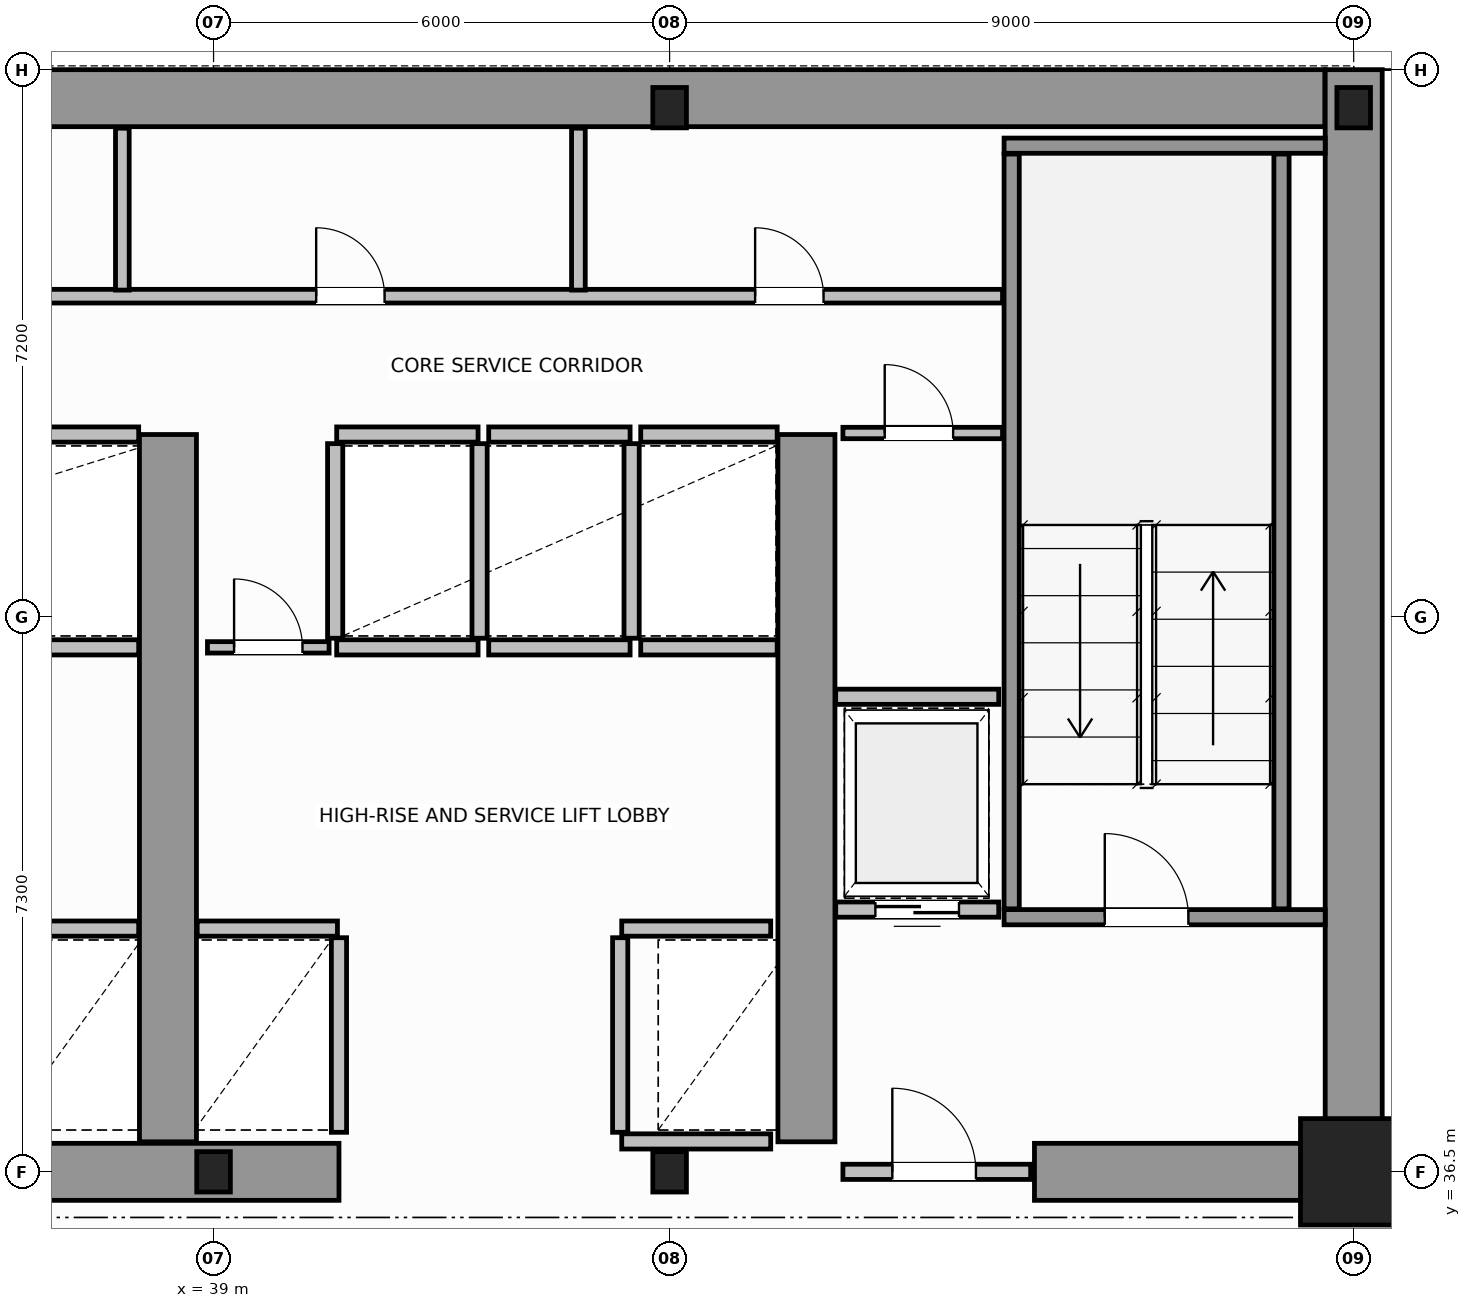
"""IFC4 building model, lengths in metres.
Left out: names, types, materials, properties, quantities, classifications, styles, units other than length and angle.
Written with IfcOpenShell. Run it as: python <this file> out.ifc"""

import sys

from ifc_helpers import new_model, si_unit, direction, frame, frame_2d, origin, origin_2d, place, context, subcontext, project, spatial, rectangle, i_section, extrude, source, transform, mapped, element, fill, save


model = new_model("IFC4")
c1 = context("Model", 3, precision=1e-05, world=origin(), true_north=direction((0.0, 1.0)))
c2 = subcontext(c1, "Body", "Model", "MODEL_VIEW")
j1 = project(units=[si_unit("LENGTHUNIT", "METRE"), si_unit("PLANEANGLEUNIT", "RADIAN")], contexts=[c1])
p1 = place(None, origin())
s1 = spatial("IfcSite", under=j1, at=p1, CompositionType="ELEMENT")
p2 = place(p1, origin())
s2 = spatial("IfcBuilding", under=s1, at=p2, CompositionType="ELEMENT")
p3 = place(p2, frame((0.0, 0.0, 95.8)))
s3 = spatial("IfcBuildingStorey", under=s2, at=p3, CompositionType="ELEMENT", Elevation=95.8)
m1 = source(origin(), c2, "Body", "SweptSolid", [
    extrude(i_section(OverallWidth=0.442, OverallDepth=0.531, WebThickness=0.065, FlangeThickness=0.076, FilletRadius=0.015, at=origin_2d()), origin(), (0.0, 0.0, 1.0), 3.8),
])
for number, where, z_axis, x_axis in (
    (1, (39.0, 36.5, 0.0), (0.0, 0.0, 1.0), (1.0, 0.0, 0.0)),
    (2, (45.0, 36.5, 0.0), (0.0, 0.0, 1.0), (1.0, 0.0, 0.0)),
):
    element("IfcColumn", number, at=place(p3, frame(where, z_axis=z_axis, x_axis=x_axis)), inside=s3, PredefinedType="COLUMN", context=c2, shape_type="MappedRepresentation", body=[
        mapped(m1, transform((0.0, 0.0, 0.0), scale=1.0)),
    ])
m2 = source(origin(), c2, "Body", "SweptSolid", [
    extrude(rectangle(XDim=1.4, YDim=1.4, at=origin_2d()), origin(), (0.0, 0.0, 1.0), 3.8),
])
p4 = place(p3, frame((54.0, 36.5, 0.0), z_axis=(0.0, 0.0, 1.0), x_axis=(1.0, 0.0, 0.0)))
e3 = element("IfcColumn", 3, at=p4, inside=s3, PredefinedType="COLUMN", context=c2, shape_type="MappedRepresentation", body=[
    mapped(m2, transform((0.0, 0.0, 0.0), scale=1.0)),
])
for number, where, z_axis, x_axis in (
    (4, (45.0, 50.5, 0.0), (0.0, 0.0, 1.0), (1.0, 0.0, 0.0)),
    (5, (54.0, 50.5, 0.0), (0.0, 0.0, 1.0), (1.0, 0.0, 0.0)),
):
    element("IfcColumn", number, at=place(p3, frame(where, z_axis=z_axis, x_axis=x_axis)), inside=s3, PredefinedType="COLUMN", context=c2, shape_type="MappedRepresentation", body=[
        mapped(m1, transform((0.0, 0.0, 0.0), scale=1.0)),
    ])
p5 = place(p3, frame((34.002, 50.625, 0.0), z_axis=(0.0, 0.0, 1.0), x_axis=(1.0, 0.0, 0.0)))
e6 = element("IfcWall", 6, at=p5, inside=s3, PredefinedType="SHEAR", context=c2, shape_type="SweptSolid", body=[
    extrude(rectangle(XDim=19.619, YDim=0.75, at=frame_2d((9.81, 0.0))), origin(), (0.0, 0.0, 1.0), 3.8),
])
p6 = place(p3, frame((54.0, 36.5, 0.0), z_axis=(0.0, 0.0, 1.0), x_axis=(0.0, 1.0, 0.0)))
e7 = element("IfcWall", 7, at=p6, inside=s3, PredefinedType="SHEAR", context=c2, shape_type="SweptSolid", body=[
    extrude(rectangle(XDim=14.5, YDim=0.75, at=frame_2d((7.25, 0.0))), origin(), (0.0, 0.0, 1.0), 3.8),
])
p7 = place(p3, frame((36.15, 36.5, 0.0), z_axis=(0.0, 0.0, 1.0), x_axis=(1.0, 0.0, 0.0)))
e8 = element("IfcWall", 8, at=p7, inside=s3, PredefinedType="SHEAR", context=c2, shape_type="SweptSolid", body=[
    extrude(rectangle(XDim=4.5, YDim=0.75, at=frame_2d((2.25, 0.0))), origin(), (0.0, 0.0, 1.0), 3.8),
])
p8 = place(p3, frame((49.8, 36.5, 0.0), z_axis=(0.0, 0.0, 1.0), x_axis=(1.0, 0.0, 0.0)))
e9 = element("IfcWall", 9, at=p8, inside=s3, PredefinedType="SHEAR", context=c2, shape_type="SweptSolid", body=[
    extrude(rectangle(XDim=3.805, YDim=0.75, at=frame_2d((1.902, 0.0))), origin(), (0.0, 0.0, 1.0), 2.38),
])
for number, where, z_axis, x_axis in (
    (10, (38.4, 36.895, 0.0), (0.0, 0.0, 1.0), (0.0, 1.0, 0.0)),
    (11, (46.8, 36.895, 0.0), (0.0, 0.0, 1.0), (0.0, 1.0, 0.0)),
):
    element("IfcWall", number, at=place(p3, frame(where, z_axis=z_axis, x_axis=x_axis)), inside=s3, PredefinedType="SHEAR", context=c2, shape_type="SweptSolid", body=[
        extrude(rectangle(XDim=9.305, YDim=0.75, at=frame_2d((4.652, 0.0))), origin(), (0.0, 0.0, 1.0), 3.8),
    ])
p9 = place(p3, frame((49.4, 39.85, 0.0), z_axis=(0.0, 0.0, 1.0), x_axis=(1.0, 0.0, 0.0)))
e12 = element("IfcWall", 12, at=p9, inside=s3, PredefinedType="SOLIDWALL", context=c2, shape_type="SweptSolid", body=[
    extrude(rectangle(XDim=4.225, YDim=0.2, at=frame_2d((2.113, 0.0))), origin(), (0.0, 0.0, 1.0), 3.8),
])
p10 = place(p9, frame((1.325, 0.0, 0.0)))
e13 = element("IfcOpeningElement", 13, at=p10, cuts=e12, PredefinedType="OPENING", context=c2, shape_type="SweptSolid", body=[
    extrude(rectangle(XDim=1.1, YDim=2.15, at=frame_2d((0.55, 1.075))), frame((0.0, 0.11, 0.0), z_axis=(0.0, -1.0, 0.0), x_axis=(1.0, 0.0, 0.0)), (0.0, 0.0, 1.0), 0.22),
])
p11 = place(p3, frame((49.4, 50.0, 0.0), z_axis=(0.0, 0.0, 1.0), x_axis=(1.0, 0.0, 0.0)))
e14 = element("IfcWall", 14, at=p11, inside=s3, PredefinedType="SOLIDWALL", context=c2, shape_type="SweptSolid", body=[
    extrude(rectangle(XDim=4.225, YDim=0.2, at=frame_2d((2.113, 0.0))), origin(), (0.0, 0.0, 1.0), 3.8),
])
for number, where, z_axis, x_axis in (
    (15, (49.5, 39.96, 0.0), (0.0, 0.0, 1.0), (0.0, 1.0, 0.0)),
    (16, (53.05, 39.96, 0.0), (0.0, 0.0, 1.0), (0.0, 1.0, 0.0)),
):
    element("IfcWall", number, at=place(p3, frame(where, z_axis=z_axis, x_axis=x_axis)), inside=s3, PredefinedType="SOLIDWALL", context=c2, shape_type="SweptSolid", body=[
        extrude(rectangle(XDim=9.93, YDim=0.2, at=frame_2d((4.965, 0.0))), origin(), (0.0, 0.0, 1.0), 3.8),
    ])
p12 = place(p3, frame((47.28, 36.5, 0.0), z_axis=(0.0, 0.0, 1.0), x_axis=(1.0, 0.0, 0.0)))
e17 = element("IfcWall", 17, at=p12, inside=s3, PredefinedType="SOLIDWALL", context=c2, shape_type="SweptSolid", body=[
    extrude(rectangle(XDim=2.47, YDim=0.2, at=frame_2d((1.235, 0.0))), origin(), (0.0, 0.0, 1.0), 2.37),
])
p13 = place(p12, frame((0.65, 0.0, 0.0)))
e18 = element("IfcOpeningElement", 18, at=p13, cuts=e17, PredefinedType="OPENING", context=c2, shape_type="SweptSolid", body=[
    extrude(rectangle(XDim=1.1, YDim=2.15, at=frame_2d((0.55, 1.075))), frame((0.0, 0.11, 0.0), z_axis=(0.0, -1.0, 0.0), x_axis=(1.0, 0.0, 0.0)), (0.0, 0.0, 1.0), 0.22),
])
p14 = place(p3, frame((36.17, 39.7, 0.0), z_axis=(0.0, 0.0, 1.0), x_axis=(1.0, 0.0, 0.0)))
e19 = element("IfcWall", 19, at=p14, inside=s3, PredefinedType="SOLIDWALL", context=c2, shape_type="SweptSolid", body=[
    extrude(rectangle(XDim=1.845, YDim=0.2, at=frame_2d((0.922, 0.0))), origin(), (0.0, 0.0, 1.0), 3.58),
])
for number, where, z_axis, x_axis in (
    (20, (36.29, 43.4, 0.0), (0.0, 0.0, 1.0), (1.0, 0.0, 0.0)),
    (21, (36.29, 46.2, 0.0), (0.0, 0.0, 1.0), (1.0, 0.0, 0.0)),
):
    element("IfcWall", number, at=place(p3, frame(where, z_axis=z_axis, x_axis=x_axis)), inside=s3, PredefinedType="SOLIDWALL", context=c2, shape_type="SweptSolid", body=[
        extrude(rectangle(XDim=1.725, YDim=0.2, at=frame_2d((0.862, 0.0))), origin(), (0.0, 0.0, 1.0), 3.58),
    ])
p15 = place(p3, frame((38.785, 39.7, 0.0), z_axis=(0.0, 0.0, 1.0), x_axis=(1.0, 0.0, 0.0)))
e22 = element("IfcWall", 22, at=p15, inside=s3, PredefinedType="SOLIDWALL", context=c2, shape_type="SweptSolid", body=[
    extrude(rectangle(XDim=1.845, YDim=0.2, at=frame_2d((0.922, 0.0))), origin(), (0.0, 0.0, 1.0), 3.58),
])
p16 = place(p3, frame((40.65, 37.02, 0.0), z_axis=(0.0, 0.0, 1.0), x_axis=(0.0, 1.0, 0.0)))
e23 = element("IfcWall", 23, at=p16, inside=s3, PredefinedType="SOLIDWALL", context=c2, shape_type="SweptSolid", body=[
    extrude(rectangle(XDim=2.56, YDim=0.2, at=frame_2d((1.28, 0.0))), origin(), (0.0, 0.0, 1.0), 3.58),
])
p17 = place(p3, frame((44.37, 39.7, 0.0), z_axis=(0.0, 0.0, 1.0), x_axis=(1.0, 0.0, 0.0)))
e24 = element("IfcWall", 24, at=p17, inside=s3, PredefinedType="SOLIDWALL", context=c2, shape_type="SweptSolid", body=[
    extrude(rectangle(XDim=1.96, YDim=0.2, at=frame_2d((0.98, 0.0))), origin(), (0.0, 0.0, 1.0), 3.58),
])
p18 = place(p3, frame((44.37, 36.9, 0.0), z_axis=(0.0, 0.0, 1.0), x_axis=(1.0, 0.0, 0.0)))
e25 = element("IfcWall", 25, at=p18, inside=s3, PredefinedType="SOLIDWALL", context=c2, shape_type="SweptSolid", body=[
    extrude(rectangle(XDim=1.96, YDim=0.2, at=frame_2d((0.98, 0.0))), origin(), (0.0, 0.0, 1.0), 2.37),
])
p19 = place(p3, frame((44.35, 37.02, 0.0), z_axis=(0.0, 0.0, 1.0), x_axis=(0.0, 1.0, 0.0)))
e26 = element("IfcWall", 26, at=p19, inside=s3, PredefinedType="SOLIDWALL", context=c2, shape_type="SweptSolid", body=[
    extrude(rectangle(XDim=2.56, YDim=0.2, at=frame_2d((1.28, 0.0))), origin(), (0.0, 0.0, 1.0), 3.58),
])
for number, where, z_axis, x_axis in (
    (27, (40.62, 43.4, 0.0), (0.0, 0.0, 1.0), (1.0, 0.0, 0.0)),
    (28, (40.62, 46.2, 0.0), (0.0, 0.0, 1.0), (1.0, 0.0, 0.0)),
):
    element("IfcWall", number, at=place(p3, frame(where, z_axis=z_axis, x_axis=x_axis)), inside=s3, PredefinedType="SOLIDWALL", context=c2, shape_type="SweptSolid", body=[
        extrude(rectangle(XDim=1.86, YDim=0.2, at=frame_2d((0.93, 0.0))), origin(), (0.0, 0.0, 1.0), 3.58),
    ])
for number, where, z_axis, x_axis in (
    (29, (40.6, 43.52, 0.0), (0.0, 0.0, 1.0), (0.0, 1.0, 0.0)),
    (30, (42.5, 43.52, 0.0), (0.0, 0.0, 1.0), (0.0, 1.0, 0.0)),
):
    element("IfcWall", number, at=place(p3, frame(where, z_axis=z_axis, x_axis=x_axis)), inside=s3, PredefinedType="SOLIDWALL", context=c2, shape_type="SweptSolid", body=[
        extrude(rectangle(XDim=2.56, YDim=0.2, at=frame_2d((1.28, 0.0))), origin(), (0.0, 0.0, 1.0), 3.58),
    ])
for number, where, z_axis, x_axis in (
    (31, (42.62, 43.4, 0.0), (0.0, 0.0, 1.0), (1.0, 0.0, 0.0)),
    (32, (42.62, 46.2, 0.0), (0.0, 0.0, 1.0), (1.0, 0.0, 0.0)),
):
    element("IfcWall", number, at=place(p3, frame(where, z_axis=z_axis, x_axis=x_axis)), inside=s3, PredefinedType="SOLIDWALL", context=c2, shape_type="SweptSolid", body=[
        extrude(rectangle(XDim=1.86, YDim=0.2, at=frame_2d((0.93, 0.0))), origin(), (0.0, 0.0, 1.0), 3.58),
    ])
p20 = place(p3, frame((44.5, 43.52, 0.0), z_axis=(0.0, 0.0, 1.0), x_axis=(0.0, 1.0, 0.0)))
e33 = element("IfcWall", 33, at=p20, inside=s3, PredefinedType="SOLIDWALL", context=c2, shape_type="SweptSolid", body=[
    extrude(rectangle(XDim=2.56, YDim=0.2, at=frame_2d((1.28, 0.0))), origin(), (0.0, 0.0, 1.0), 3.58),
])
for number, where, z_axis, x_axis in (
    (34, (44.62, 43.4, 0.0), (0.0, 0.0, 1.0), (1.0, 0.0, 0.0)),
    (35, (44.62, 46.2, 0.0), (0.0, 0.0, 1.0), (1.0, 0.0, 0.0)),
):
    element("IfcWall", number, at=place(p3, frame(where, z_axis=z_axis, x_axis=x_axis)), inside=s3, PredefinedType="SOLIDWALL", context=c2, shape_type="SweptSolid", body=[
        extrude(rectangle(XDim=1.795, YDim=0.2, at=frame_2d((0.897, 0.0))), origin(), (0.0, 0.0, 1.0), 3.58),
    ])
p21 = place(p3, frame((47.185, 39.95, 0.0), z_axis=(0.0, 0.0, 1.0), x_axis=(1.0, 0.0, 0.0)))
e36 = element("IfcWall", 36, at=p21, inside=s3, PredefinedType="SOLIDWALL", context=c2, shape_type="SweptSolid", body=[
    extrude(rectangle(XDim=2.145, YDim=0.2, at=frame_2d((1.073, 0.0))), origin(), (0.0, 0.0, 1.0), 3.58),
])
p22 = place(p21, frame((0.522, 0.0, 0.0)))
e37 = element("IfcOpeningElement", 37, at=p22, cuts=e36, PredefinedType="OPENING", context=c2, shape_type="SweptSolid", body=[
    extrude(rectangle(XDim=1.1, YDim=2.15, at=frame_2d((0.55, 1.075))), frame((0.0, 0.11, 0.0), z_axis=(0.0, -1.0, 0.0), x_axis=(1.0, 0.0, 0.0)), (0.0, 0.0, 1.0), 0.22),
])
p23 = place(p3, frame((47.185, 42.75, 0.0), z_axis=(0.0, 0.0, 1.0), x_axis=(1.0, 0.0, 0.0)))
e38 = element("IfcWall", 38, at=p23, inside=s3, PredefinedType="SOLIDWALL", context=c2, shape_type="SweptSolid", body=[
    extrude(rectangle(XDim=2.145, YDim=0.2, at=frame_2d((1.073, 0.0))), origin(), (0.0, 0.0, 1.0), 3.58),
])
p24 = place(p3, frame((47.28, 46.22, 0.0), z_axis=(0.0, 0.0, 1.0), x_axis=(1.0, 0.0, 0.0)))
e39 = element("IfcWall", 39, at=p24, inside=s3, PredefinedType="PARTITIONING", context=c2, shape_type="SweptSolid", body=[
    extrude(rectangle(XDim=2.1, YDim=0.15, at=frame_2d((1.05, 0.0))), origin(), (0.0, 0.0, 1.0), 3.58),
])
p25 = place(p24, frame((0.55, 0.0, 0.0)))
e40 = element("IfcOpeningElement", 40, at=p25, cuts=e39, PredefinedType="OPENING", context=c2, shape_type="SweptSolid", body=[
    extrude(rectangle(XDim=0.9, YDim=2.1, at=frame_2d((0.45, 1.05))), frame((0.0, 0.085, 0.0), z_axis=(0.0, -1.0, 0.0), x_axis=(1.0, 0.0, 0.0)), (0.0, 0.0, 1.0), 0.17),
])
p26 = place(p3, frame((38.92, 43.4, 0.0), z_axis=(0.0, 0.0, 1.0), x_axis=(1.0, 0.0, 0.0)))
e41 = element("IfcWall", 41, at=p26, inside=s3, PredefinedType="PARTITIONING", context=c2, shape_type="SweptSolid", body=[
    extrude(rectangle(XDim=1.6, YDim=0.15, at=frame_2d((0.8, 0.0))), origin(), (0.0, 0.0, 1.0), 3.58),
])
p27 = place(p26, frame((0.35, 0.0, 0.0)))
e42 = element("IfcOpeningElement", 42, at=p27, cuts=e41, PredefinedType="OPENING", context=c2, shape_type="SweptSolid", body=[
    extrude(rectangle(XDim=0.9, YDim=2.1, at=frame_2d((0.45, 1.05))), frame((0.0, 0.085, 0.0), z_axis=(0.0, -1.0, 0.0), x_axis=(1.0, 0.0, 0.0)), (0.0, 0.0, 1.0), 0.17),
])
p28 = place(p3, frame((18.62, 48.02, 0.0), z_axis=(0.0, 0.0, 1.0), x_axis=(1.0, 0.0, 0.0)))
e43 = element("IfcWall", 43, at=p28, inside=s3, PredefinedType="PLUMBINGWALL", context=c2, shape_type="SweptSolid", body=[
    extrude(rectangle(XDim=30.76, YDim=0.18, at=frame_2d((15.38, 0.0))), origin(), (0.0, 0.0, 1.0), 3.58),
])
p29 = place(p28, frame((1.655, 0.0, 0.0)))
e44 = element("IfcOpeningElement", 44, at=p29, cuts=e43, PredefinedType="OPENING", context=c2, shape_type="SweptSolid", body=[
    extrude(rectangle(XDim=0.9, YDim=2.15, at=frame_2d((0.45, 1.075))), frame((0.0, 0.1, 0.0), z_axis=(0.0, -1.0, 0.0), x_axis=(1.0, 0.0, 0.0)), (0.0, 0.0, 1.0), 0.2),
])
p30 = place(p28, frame((6.03, 0.0, 0.0)))
e45 = element("IfcOpeningElement", 45, at=p30, cuts=e43, PredefinedType="OPENING", context=c2, shape_type="SweptSolid", body=[
    extrude(rectangle(XDim=0.9, YDim=2.15, at=frame_2d((0.45, 1.075))), frame((0.0, 0.1, 0.0), z_axis=(0.0, -1.0, 0.0), x_axis=(1.0, 0.0, 0.0)), (0.0, 0.0, 1.0), 0.2),
])
p31 = place(p28, frame((10.93, 0.0, 0.0)))
e46 = element("IfcOpeningElement", 46, at=p31, cuts=e43, PredefinedType="OPENING", context=c2, shape_type="SweptSolid", body=[
    extrude(rectangle(XDim=0.9, YDim=2.15, at=frame_2d((0.45, 1.075))), frame((0.0, 0.1, 0.0), z_axis=(0.0, -1.0, 0.0), x_axis=(1.0, 0.0, 0.0)), (0.0, 0.0, 1.0), 0.2),
])
p32 = place(p28, frame((16.13, 0.0, 0.0)))
e47 = element("IfcOpeningElement", 47, at=p32, cuts=e43, PredefinedType="OPENING", context=c2, shape_type="SweptSolid", body=[
    extrude(rectangle(XDim=0.9, YDim=2.15, at=frame_2d((0.45, 1.075))), frame((0.0, 0.1, 0.0), z_axis=(0.0, -1.0, 0.0), x_axis=(1.0, 0.0, 0.0)), (0.0, 0.0, 1.0), 0.2),
])
p33 = place(p28, frame((21.73, 0.0, 0.0)))
e48 = element("IfcOpeningElement", 48, at=p33, cuts=e43, PredefinedType="OPENING", context=c2, shape_type="SweptSolid", body=[
    extrude(rectangle(XDim=0.9, YDim=2.15, at=frame_2d((0.45, 1.075))), frame((0.0, 0.1, 0.0), z_axis=(0.0, -1.0, 0.0), x_axis=(1.0, 0.0, 0.0)), (0.0, 0.0, 1.0), 0.2),
])
p34 = place(p28, frame((27.505, 0.0, 0.0)))
e49 = element("IfcOpeningElement", 49, at=p34, cuts=e43, PredefinedType="OPENING", context=c2, shape_type="SweptSolid", body=[
    extrude(rectangle(XDim=0.9, YDim=2.15, at=frame_2d((0.45, 1.075))), frame((0.0, 0.1, 0.0), z_axis=(0.0, -1.0, 0.0), x_axis=(1.0, 0.0, 0.0)), (0.0, 0.0, 1.0), 0.2),
])
for number, where, z_axis, x_axis in (
    (50, (37.8, 48.1, 0.0), (0.0, 0.0, 1.0), (0.0, 1.0, 0.0)),
    (51, (43.8, 48.1, 0.0), (0.0, 0.0, 1.0), (0.0, 1.0, 0.0)),
):
    element("IfcWall", number, at=place(p3, frame(where, z_axis=z_axis, x_axis=x_axis)), inside=s3, PredefinedType="PLUMBINGWALL", context=c2, shape_type="SweptSolid", body=[
        extrude(rectangle(XDim=2.13, YDim=0.18, at=frame_2d((1.065, 0.0))), origin(), (0.0, 0.0, 1.0), 3.58),
    ])
p35 = place(p3, frame((54.06, 36.48, 0.0), z_axis=(0.0, 0.0, 1.0), x_axis=(1.0, 0.0, 0.0)))
e52 = element("IfcWall", 52, at=p35, inside=s3, PredefinedType="PARTITIONING", context=c2, shape_type="SweptSolid", body=[
    extrude(rectangle(XDim=6.664, YDim=0.12, at=frame_2d((3.332, 0.0))), origin(), (0.0, 0.0, 1.0), 2.87),
])
p36 = place(p35, frame((2.882, 0.0, 0.0)))
e53 = element("IfcOpeningElement", 53, at=p36, cuts=e52, PredefinedType="OPENING", context=c2, shape_type="SweptSolid", body=[
    extrude(rectangle(XDim=0.9, YDim=2.15, at=frame_2d((0.45, 1.075))), frame((0.0, 0.07, 0.0), z_axis=(0.0, -1.0, 0.0), x_axis=(1.0, 0.0, 0.0)), (0.0, 0.0, 1.0), 0.14),
])
m3 = source(origin(), c2, "Body", "SweptSolid", [
    extrude(rectangle(XDim=1.1, YDim=2.15, at=frame_2d((0.55, 1.075))), frame((0.0, 0.025, 0.0), z_axis=(0.0, -1.0, 0.0), x_axis=(1.0, 0.0, 0.0)), (0.0, 0.0, 1.0), 0.05),
])
p37 = place(p10, origin())
e54 = element("IfcDoor", 54, at=p37, inside=s3, OperationType="SINGLE_SWING_RIGHT", PredefinedType="DOOR", context=c2, shape_type="MappedRepresentation", body=[
    mapped(m3, transform((0.0, 0.0, 0.0), scale=1.0)),
])
fill(e13, e54)
p38 = place(p13, origin())
e55 = element("IfcDoor", 55, at=p38, inside=s3, OperationType="SINGLE_SWING_LEFT", PredefinedType="DOOR", context=c2, shape_type="MappedRepresentation", body=[
    mapped(m3, transform((0.0, 0.0, 0.0), scale=1.0)),
])
fill(e18, e55)
p39 = place(p22, origin())
e56 = element("IfcDoor", 56, at=p39, inside=s3, OperationType="DOUBLE_DOOR_SLIDING", PredefinedType="DOOR", context=c2, shape_type="MappedRepresentation", body=[
    mapped(m3, transform((0.0, 0.0, 0.0), scale=1.0)),
])
fill(e37, e56)
m4 = source(origin(), c2, "Body", "SweptSolid", [
    extrude(rectangle(XDim=0.9, YDim=2.1, at=frame_2d((0.45, 1.05))), frame((0.0, 0.025, 0.0), z_axis=(0.0, -1.0, 0.0), x_axis=(1.0, 0.0, 0.0)), (0.0, 0.0, 1.0), 0.05),
])
p40 = place(p25, origin())
e57 = element("IfcDoor", 57, at=p40, inside=s3, OperationType="SINGLE_SWING_RIGHT", PredefinedType="DOOR", context=c2, shape_type="MappedRepresentation", body=[
    mapped(m4, transform((0.0, 0.0, 0.0), scale=1.0)),
])
fill(e40, e57)
p41 = place(p27, origin())
e58 = element("IfcDoor", 58, at=p41, inside=s3, OperationType="SINGLE_SWING_LEFT", PredefinedType="DOOR", context=c2, shape_type="MappedRepresentation", body=[
    mapped(m4, transform((0.0, 0.0, 0.0), scale=1.0)),
])
fill(e42, e58)
m5 = source(origin(), c2, "Body", "SweptSolid", [
    extrude(rectangle(XDim=0.9, YDim=2.15, at=frame_2d((0.45, 1.075))), frame((0.0, 0.025, 0.0), z_axis=(0.0, -1.0, 0.0), x_axis=(1.0, 0.0, 0.0)), (0.0, 0.0, 1.0), 0.05),
])
p42 = place(p33, origin())
e59 = element("IfcDoor", 59, at=p42, inside=s3, OperationType="SINGLE_SWING_LEFT", PredefinedType="DOOR", context=c2, shape_type="MappedRepresentation", body=[
    mapped(m5, transform((0.0, 0.0, 0.0), scale=1.0)),
])
fill(e48, e59)
p43 = place(p34, origin())
e60 = element("IfcDoor", 60, at=p43, inside=s3, OperationType="SINGLE_SWING_RIGHT", PredefinedType="DOOR", context=c2, shape_type="MappedRepresentation", body=[
    mapped(m5, transform((0.0, 0.0, 0.0), scale=1.0)),
])
fill(e49, e60)
save(model, sys.argv[1])
